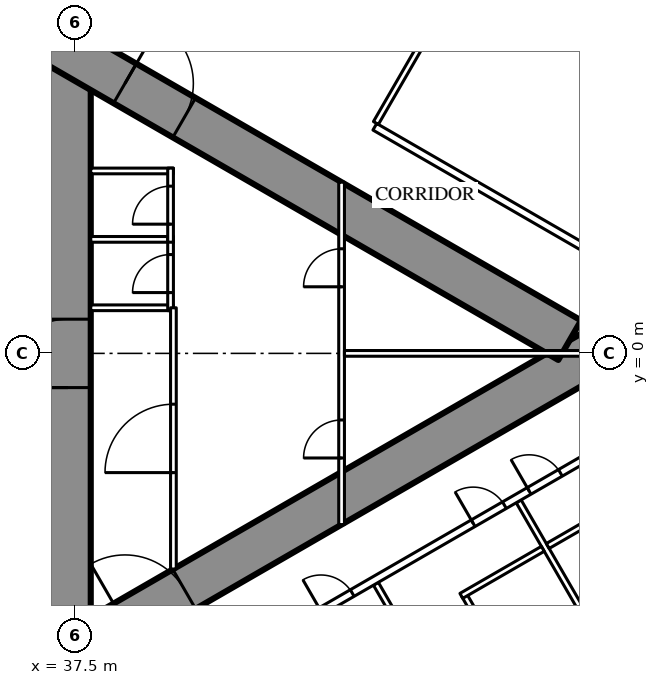
"""IFC4 building model, lengths in metres.
Left out: names, types, materials, properties, quantities, classifications, styles, units other than length and angle.
Written with IfcOpenShell. Run it as: python <this file> out.ifc"""

import sys

from ifc_helpers import new_model, si_unit, direction, frame, frame_2d, origin, place, context, subcontext, project, spatial, rectangle, extrude, element, fill, save


model = new_model("IFC4")
c1 = context("Model", 3, precision=1e-05, world=origin(), true_north=direction((0.0, 1.0)))
c2 = subcontext(c1, "Body", "Model", "MODEL_VIEW")
j1 = project(units=[si_unit("LENGTHUNIT", "METRE"), si_unit("PLANEANGLEUNIT", "RADIAN")], contexts=[c1])
p1 = place(None, origin())
s1 = spatial("IfcSite", under=j1, at=p1, CompositionType="ELEMENT")
p2 = place(p1, origin())
s2 = spatial("IfcBuilding", under=s1, at=p2, CompositionType="ELEMENT")
p3 = place(p2, frame((0.0, 0.0, 49.5)))
s3 = spatial("IfcBuildingStorey", under=s2, at=p3, CompositionType="ELEMENT", Elevation=49.5)
p4 = place(p3, frame((37.3, -8.6, 0.0), z_axis=(0.0, 0.0, 1.0), x_axis=(0.0, 1.0, 0.0)))
e1 = element("IfcWall", 1, at=p4, inside=s3, PredefinedType="SHEAR", context=c2, shape_type="SweptSolid", body=[
    extrude(rectangle(XDim=17.2, YDim=1.2, at=frame_2d((8.6, 0.0))), origin(), (0.0, 0.0, 1.0), 3.5),
])
p5 = place(p4, frame((7.7, 0.0, 0.0)))
e2 = element("IfcOpeningElement", 2, at=p5, cuts=e1, PredefinedType="OPENING", context=c2, shape_type="SweptSolid", body=[
    extrude(rectangle(XDim=1.8, YDim=2.2, at=frame_2d((0.9, 1.1))), frame((0.0, 0.61, 0.0), z_axis=(0.0, -1.0, 0.0), x_axis=(1.0, 0.0, 0.0)), (0.0, 0.0, 1.0), 1.22),
])
p6 = place(p3, frame((27.2, -13.8, 0.0), z_axis=(0.0, 0.0, 1.0), x_axis=(0.866027159892, 0.499996958321, 0.0)))
e3 = element("IfcWall", 3, at=p6, inside=s3, PredefinedType="SHEAR", context=c2, shape_type="SweptSolid", body=[
    extrude(rectangle(XDim=27.947, YDim=1.2, at=frame_2d((13.973, 0.0))), origin(), (0.0, 0.0, 1.0), 3.5),
])
p7 = place(p6, frame((4.6, 0.0, 0.0)))
e4 = element("IfcOpeningElement", 4, at=p7, cuts=e3, PredefinedType="OPENING", context=c2, shape_type="SweptSolid", body=[
    extrude(rectangle(XDim=1.0, YDim=2.2, at=frame_2d((0.5, 1.1))), frame((0.0, 0.61, 0.0), z_axis=(0.0, -1.0, 0.0), x_axis=(1.0, 0.0, 0.0)), (0.0, 0.0, 1.0), 1.22),
])
p8 = place(p6, frame((13.395, 0.0, 0.0)))
e5 = element("IfcOpeningElement", 5, at=p8, cuts=e3, PredefinedType="OPENING", context=c2, shape_type="SweptSolid", body=[
    extrude(rectangle(XDim=1.8, YDim=2.2, at=frame_2d((0.9, 1.1))), frame((0.0, 0.61, 0.0), z_axis=(0.0, -1.0, 0.0), x_axis=(1.0, 0.0, 0.0)), (0.0, 0.0, 1.0), 1.22),
])
p9 = place(p3, frame((27.2, 13.8, 0.0), z_axis=(0.0, 0.0, 1.0), x_axis=(0.866024515034, -0.500001539357, 0.0)))
e6 = element("IfcWall", 6, at=p9, inside=s3, PredefinedType="SHEAR", context=c2, shape_type="SweptSolid", body=[
    extrude(rectangle(XDim=26.907, YDim=1.2, at=frame_2d((13.454, 0.0))), origin(), (0.0, 0.0, 1.0), 3.5),
])
p10 = place(p9, frame((4.6, 0.0, 0.0)))
e7 = element("IfcOpeningElement", 7, at=p10, cuts=e6, PredefinedType="OPENING", context=c2, shape_type="SweptSolid", body=[
    extrude(rectangle(XDim=1.0, YDim=2.2, at=frame_2d((0.5, 1.1))), frame((0.0, 0.61, 0.0), z_axis=(0.0, -1.0, 0.0), x_axis=(1.0, 0.0, 0.0)), (0.0, 0.0, 1.0), 1.22),
])
p11 = place(p9, frame((13.395, 0.0, 0.0)))
e8 = element("IfcOpeningElement", 8, at=p11, cuts=e6, PredefinedType="OPENING", context=c2, shape_type="SweptSolid", body=[
    extrude(rectangle(XDim=1.8, YDim=2.2, at=frame_2d((0.9, 1.1))), frame((0.0, 0.61, 0.0), z_axis=(0.0, -1.0, 0.0), x_axis=(1.0, 0.0, 0.0)), (0.0, 0.0, 1.0), 1.22),
])
p12 = place(p3, frame((45.403, -6.062, 0.0), z_axis=(0.0, 0.0, 1.0), x_axis=(0.500007077968, -0.866021317279, 0.0)))
e9 = element("IfcWall", 9, at=p12, inside=s3, PredefinedType="PARTITIONING", context=c2, shape_type="SweptSolid", body=[
    extrude(rectangle(XDim=12.721, YDim=0.15, at=frame_2d((6.361, 0.0))), origin(), (0.0, 0.0, 1.0), 3.25),
])
p13 = place(p3, frame((49.159, -3.893, 0.0), z_axis=(0.0, 0.0, 1.0), x_axis=(0.499998773722, -0.866026111775, 0.0)))
e10 = element("IfcWall", 10, at=p13, inside=s3, PredefinedType="PARTITIONING", context=c2, shape_type="SweptSolid", body=[
    extrude(rectangle(XDim=9.892, YDim=0.15, at=frame_2d((4.946, 0.0))), origin(), (0.0, 0.0, 1.0), 2.25),
])
p14 = place(p3, frame((45.403, 6.062, 0.0), z_axis=(0.0, 0.0, 1.0), x_axis=(0.500013434677, 0.866017647131, 0.0)))
e11 = element("IfcWall", 11, at=p14, inside=s3, PredefinedType="PARTITIONING", context=c2, shape_type="SweptSolid", body=[
    extrude(rectangle(XDim=9.902, YDim=0.15, at=frame_2d((4.951, 0.0))), origin(), (0.0, 0.0, 1.0), 2.25),
])
p15 = place(p3, frame((37.96, -10.243, 0.0), z_axis=(0.0, 0.0, 1.0), x_axis=(0.866026429433, 0.499998223521, 0.0)))
e12 = element("IfcWall", 12, at=p15, inside=s3, PredefinedType="PARTITIONING", context=c2, shape_type="SweptSolid", body=[
    extrude(rectangle(XDim=20.487, YDim=0.2, at=frame_2d((10.243, 0.0))), origin(), (0.0, 0.0, 1.0), 3.25),
])
p16 = place(p15, frame((6.925, 0.0, 0.0)))
e13 = element("IfcOpeningElement", 13, at=p16, cuts=e12, PredefinedType="OPENING", context=c2, shape_type="SweptSolid", body=[
    extrude(rectangle(XDim=0.95, YDim=2.2, at=frame_2d((0.475, 1.1))), frame((0.0, 0.11, 0.0), z_axis=(0.0, -1.0, 0.0), x_axis=(1.0, 0.0, 0.0)), (0.0, 0.0, 1.0), 0.22),
])
p17 = place(p15, frame((11.549, 0.0, 0.0)))
e14 = element("IfcOpeningElement", 14, at=p17, cuts=e12, PredefinedType="OPENING", context=c2, shape_type="SweptSolid", body=[
    extrude(rectangle(XDim=0.95, YDim=2.2, at=frame_2d((0.475, 1.1))), frame((0.0, 0.11, 0.0), z_axis=(0.0, -1.0, 0.0), x_axis=(1.0, 0.0, 0.0)), (0.0, 0.0, 1.0), 0.22),
])
p18 = place(p15, frame((13.249, 0.0, 0.0)))
e15 = element("IfcOpeningElement", 15, at=p18, cuts=e12, PredefinedType="OPENING", context=c2, shape_type="SweptSolid", body=[
    extrude(rectangle(XDim=0.95, YDim=2.2, at=frame_2d((0.475, 1.1))), frame((0.0, 0.11, 0.0), z_axis=(0.0, -1.0, 0.0), x_axis=(1.0, 0.0, 0.0)), (0.0, 0.0, 1.0), 0.22),
])
p19 = place(p15, frame((17.585, 0.0, 0.0)))
e16 = element("IfcOpeningElement", 16, at=p19, cuts=e12, PredefinedType="OPENING", context=c2, shape_type="SweptSolid", body=[
    extrude(rectangle(XDim=0.95, YDim=2.2, at=frame_2d((0.475, 1.1))), frame((0.0, 0.11, 0.0), z_axis=(0.0, -1.0, 0.0), x_axis=(1.0, 0.0, 0.0)), (0.0, 0.0, 1.0), 0.22),
])
p20 = place(p15, frame((0.6, 0.0, 0.0)))
e17 = element("IfcOpeningElement", 17, at=p20, cuts=e12, PredefinedType="OPENING", context=c2, shape_type="SweptSolid", body=[
    extrude(rectangle(XDim=0.95, YDim=2.2, at=frame_2d((0.475, 1.1))), frame((0.0, 0.11, 0.0), z_axis=(0.0, -1.0, 0.0), x_axis=(1.0, 0.0, 0.0)), (0.0, 0.0, 1.0), 0.22),
])
p21 = place(p3, frame((45.375, 5.963, 0.0), z_axis=(0.0, 0.0, 1.0), x_axis=(0.86603164725, -0.499989185844, 0.0)))
e18 = element("IfcWall", 18, at=p21, inside=s3, PredefinedType="PARTITIONING", context=c2, shape_type="SweptSolid", body=[
    extrude(rectangle(XDim=11.805, YDim=0.2, at=frame_2d((5.903, 0.0))), origin(), (0.0, 0.0, 1.0), 3.25),
])
p22 = place(p21, frame((9.024, 0.0, 0.0)))
e19 = element("IfcOpeningElement", 19, at=p22, cuts=e18, PredefinedType="OPENING", context=c2, shape_type="SweptSolid", body=[
    extrude(rectangle(XDim=0.95, YDim=2.2, at=frame_2d((0.475, 1.1))), frame((0.0, 0.11, 0.0), z_axis=(0.0, -1.0, 0.0), x_axis=(1.0, 0.0, 0.0)), (0.0, 0.0, 1.0), 0.22),
])
p23 = place(p21, frame((7.324, 0.0, 0.0)))
e20 = element("IfcOpeningElement", 20, at=p23, cuts=e18, PredefinedType="OPENING", context=c2, shape_type="SweptSolid", body=[
    extrude(rectangle(XDim=0.95, YDim=2.2, at=frame_2d((0.475, 1.1))), frame((0.0, 0.11, 0.0), z_axis=(0.0, -1.0, 0.0), x_axis=(1.0, 0.0, 0.0)), (0.0, 0.0, 1.0), 0.22),
])
p24 = place(p3, frame((47.716, -6.343, 0.0), z_axis=(0.0, 0.0, 1.0), x_axis=(0.500006934395, -0.866021400173, 0.0)))
e21 = element("IfcWall", 21, at=p24, inside=s3, PredefinedType="PARTITIONING", context=c2, shape_type="SweptSolid", body=[
    extrude(rectangle(XDim=2.6, YDim=0.15, at=frame_2d((1.3, 0.0))), origin(), (0.0, 0.0, 1.0), 3.25),
])
p25 = place(p24, frame((0.9, 0.0, 0.0)))
e22 = element("IfcOpeningElement", 22, at=p25, cuts=e21, PredefinedType="OPENING", context=c2, shape_type="SweptSolid", body=[
    extrude(rectangle(XDim=0.8, YDim=2.2, at=frame_2d((0.4, 1.1))), frame((0.0, 0.085, 0.0), z_axis=(0.0, -1.0, 0.0), x_axis=(1.0, 0.0, 0.0)), (0.0, 0.0, 1.0), 0.17),
])
p26 = place(p3, frame((47.651, -6.38, 0.0), z_axis=(0.0, 0.0, 1.0), x_axis=(0.866031185235, 0.4999899861, 0.0)))
e23 = element("IfcWall", 23, at=p26, inside=s3, PredefinedType="PARTITIONING", context=c2, shape_type="SweptSolid", body=[
    extrude(rectangle(XDim=2.475, YDim=0.15, at=frame_2d((1.238, 0.0))), origin(), (0.0, 0.0, 1.0), 3.25),
])
p27 = place(p3, frame((49.925, -5.068, 0.0), z_axis=(0.0, 0.0, 1.0), x_axis=(0.866006523861, 0.500032699561, 0.0)))
e24 = element("IfcWall", 24, at=p27, inside=s3, PredefinedType="PARTITIONING", context=c2, shape_type="SweptSolid", body=[
    extrude(rectangle(XDim=2.475, YDim=0.15, at=frame_2d((1.237, 0.0))), origin(), (0.0, 0.0, 1.0), 3.25),
])
for number, where, z_axis, x_axis in (
    (25, (37.9, 1.2, 0.0), (0.0, 0.0, 1.0), (1.0, 0.0, 0.0)),
    (26, (37.9, 3.0, 0.0), (0.0, 0.0, 1.0), (1.0, 0.0, 0.0)),
    (27, (37.9, 4.8, 0.0), (0.0, 0.0, 1.0), (1.0, 0.0, 0.0)),
):
    element("IfcWall", number, at=place(p3, frame(where, z_axis=z_axis, x_axis=x_axis)), inside=s3, PredefinedType="PARTITIONING", context=c2, shape_type="SweptSolid", body=[
        extrude(rectangle(XDim=2.175, YDim=0.15, at=frame_2d((1.087, 0.0))), origin(), (0.0, 0.0, 1.0), 3.25),
    ])
p28 = place(p3, frame((40.0, 1.125, 0.0), z_axis=(0.0, 0.0, 1.0), x_axis=(0.0, 1.0, 0.0)))
e28 = element("IfcWall", 28, at=p28, inside=s3, PredefinedType="PARTITIONING", context=c2, shape_type="SweptSolid", body=[
    extrude(rectangle(XDim=1.95, YDim=0.15, at=frame_2d((0.975, 0.0))), origin(), (0.0, 0.0, 1.0), 3.25),
])
p29 = place(p28, frame((0.475, 0.0, 0.0)))
e29 = element("IfcOpeningElement", 29, at=p29, cuts=e28, PredefinedType="OPENING", context=c2, shape_type="SweptSolid", body=[
    extrude(rectangle(XDim=1.0, YDim=2.2, at=frame_2d((0.5, 1.1))), frame((0.0, 0.085, 0.0), z_axis=(0.0, -1.0, 0.0), x_axis=(1.0, 0.0, 0.0)), (0.0, 0.0, 1.0), 0.17),
])
p30 = place(p3, frame((40.0, 2.925, 0.0), z_axis=(0.0, 0.0, 1.0), x_axis=(0.0, 1.0, 0.0)))
e30 = element("IfcWall", 30, at=p30, inside=s3, PredefinedType="PARTITIONING", context=c2, shape_type="SweptSolid", body=[
    extrude(rectangle(XDim=1.95, YDim=0.15, at=frame_2d((0.975, 0.0))), origin(), (0.0, 0.0, 1.0), 3.25),
])
p31 = place(p30, frame((0.475, 0.0, 0.0)))
e31 = element("IfcOpeningElement", 31, at=p31, cuts=e30, PredefinedType="OPENING", context=c2, shape_type="SweptSolid", body=[
    extrude(rectangle(XDim=1.0, YDim=2.2, at=frame_2d((0.5, 1.1))), frame((0.0, 0.085, 0.0), z_axis=(0.0, -1.0, 0.0), x_axis=(1.0, 0.0, 0.0)), (0.0, 0.0, 1.0), 0.17),
])
p32 = place(p3, frame((40.075, -5.674, 0.0), z_axis=(0.0, 0.0, 1.0), x_axis=(0.0, 1.0, 0.0)))
e32 = element("IfcWall", 32, at=p32, inside=s3, PredefinedType="PARTITIONING", context=c2, shape_type="SweptSolid", body=[
    extrude(rectangle(XDim=6.874, YDim=0.15, at=frame_2d((3.437, 0.0))), origin(), (0.0, 0.0, 1.0), 3.25),
])
p33 = place(p32, frame((2.537, 0.0, 0.0)))
e33 = element("IfcOpeningElement", 33, at=p33, cuts=e32, PredefinedType="OPENING", context=c2, shape_type="SweptSolid", body=[
    extrude(rectangle(XDim=1.8, YDim=2.2, at=frame_2d((0.9, 1.1))), frame((0.0, 0.085, 0.0), z_axis=(0.0, -1.0, 0.0), x_axis=(1.0, 0.0, 0.0)), (0.0, 0.0, 1.0), 0.17),
])
p34 = place(p3, frame((44.5, -4.505, 0.0), z_axis=(0.0, 0.0, 1.0), x_axis=(0.0, 1.0, 0.0)))
e34 = element("IfcWall", 34, at=p34, inside=s3, PredefinedType="PARTITIONING", context=c2, shape_type="SweptSolid", body=[
    extrude(rectangle(XDim=9.009, YDim=0.15, at=frame_2d((4.505, 0.0))), origin(), (0.0, 0.0, 1.0), 2.45),
])
p35 = place(p34, frame((1.752, 0.0, 0.0)))
e35 = element("IfcOpeningElement", 35, at=p35, cuts=e34, PredefinedType="OPENING", context=c2, shape_type="SweptSolid", body=[
    extrude(rectangle(XDim=1.0, YDim=2.2, at=frame_2d((0.5, 1.1))), frame((0.0, 0.085, 0.0), z_axis=(0.0, -1.0, 0.0), x_axis=(1.0, 0.0, 0.0)), (0.0, 0.0, 1.0), 0.17),
])
p36 = place(p34, frame((6.257, 0.0, 0.0)))
e36 = element("IfcOpeningElement", 36, at=p36, cuts=e34, PredefinedType="OPENING", context=c2, shape_type="SweptSolid", body=[
    extrude(rectangle(XDim=1.0, YDim=2.2, at=frame_2d((0.5, 1.1))), frame((0.0, 0.085, 0.0), z_axis=(0.0, -1.0, 0.0), x_axis=(1.0, 0.0, 0.0)), (0.0, 0.0, 1.0), 0.17),
])
p37 = place(p3, frame((44.575, 0.0, 0.0), z_axis=(0.0, 0.0, 1.0), x_axis=(1.0, 0.0, 0.0)))
e37 = element("IfcWall", 37, at=p37, inside=s3, PredefinedType="PARTITIONING", context=c2, shape_type="SweptSolid", body=[
    extrude(rectangle(XDim=7.727, YDim=0.15, at=frame_2d((3.864, 0.0))), origin(), (0.0, 0.0, 1.0), 2.25),
])
p38 = place(p16, origin())
e38 = element("IfcDoor", 38, at=p38, inside=s3, OperationType="SINGLE_SWING_LEFT", PredefinedType="DOOR", context=c2, shape_type="SweptSolid", body=[
    extrude(rectangle(XDim=0.95, YDim=2.2, at=frame_2d((0.475, 1.1))), frame((0.0, 0.025, 0.0), z_axis=(0.0, -1.0, 0.0), x_axis=(1.0, 0.0, 0.0)), (0.0, 0.0, 1.0), 0.05),
])
fill(e13, e38)
p39 = place(p17, origin())
e39 = element("IfcDoor", 39, at=p39, inside=s3, OperationType="SINGLE_SWING_LEFT", PredefinedType="DOOR", context=c2, shape_type="SweptSolid", body=[
    extrude(rectangle(XDim=0.95, YDim=2.2, at=frame_2d((0.475, 1.1))), frame((0.0, 0.025, 0.0), z_axis=(0.0, -1.0, 0.0), x_axis=(1.0, 0.0, 0.0)), (0.0, 0.0, 1.0), 0.05),
])
fill(e14, e39)
p40 = place(p18, origin())
e40 = element("IfcDoor", 40, at=p40, inside=s3, OperationType="SINGLE_SWING_LEFT", PredefinedType="DOOR", context=c2, shape_type="SweptSolid", body=[
    extrude(rectangle(XDim=0.95, YDim=2.2, at=frame_2d((0.475, 1.1))), frame((0.0, 0.025, 0.0), z_axis=(0.0, -1.0, 0.0), x_axis=(1.0, 0.0, 0.0)), (0.0, 0.0, 1.0), 0.05),
])
fill(e15, e40)
p41 = place(p29, origin())
e41 = element("IfcDoor", 41, at=p41, inside=s3, OperationType="SINGLE_SWING_LEFT", PredefinedType="DOOR", context=c2, shape_type="SweptSolid", body=[
    extrude(rectangle(XDim=1.0, YDim=2.2, at=frame_2d((0.5, 1.1))), frame((0.0, 0.025, 0.0), z_axis=(0.0, -1.0, 0.0), x_axis=(1.0, 0.0, 0.0)), (0.0, 0.0, 1.0), 0.05),
])
fill(e29, e41)
p42 = place(p31, origin())
e42 = element("IfcDoor", 42, at=p42, inside=s3, OperationType="SINGLE_SWING_LEFT", PredefinedType="DOOR", context=c2, shape_type="SweptSolid", body=[
    extrude(rectangle(XDim=1.0, YDim=2.2, at=frame_2d((0.5, 1.1))), frame((0.0, 0.025, 0.0), z_axis=(0.0, -1.0, 0.0), x_axis=(1.0, 0.0, 0.0)), (0.0, 0.0, 1.0), 0.05),
])
fill(e31, e42)
p43 = place(p33, origin())
e43 = element("IfcDoor", 43, at=p43, inside=s3, OperationType="DOUBLE_DOOR_SINGLE_SWING", PredefinedType="DOOR", context=c2, shape_type="SweptSolid", body=[
    extrude(rectangle(XDim=1.8, YDim=2.2, at=frame_2d((0.9, 1.1))), frame((0.0, 0.025, 0.0), z_axis=(0.0, -1.0, 0.0), x_axis=(1.0, 0.0, 0.0)), (0.0, 0.0, 1.0), 0.05),
])
fill(e33, e43)
p44 = place(p35, origin())
e44 = element("IfcDoor", 44, at=p44, inside=s3, OperationType="SINGLE_SWING_LEFT", PredefinedType="DOOR", context=c2, shape_type="SweptSolid", body=[
    extrude(rectangle(XDim=1.0, YDim=2.2, at=frame_2d((0.5, 1.1))), frame((0.0, 0.025, 0.0), z_axis=(0.0, -1.0, 0.0), x_axis=(1.0, 0.0, 0.0)), (0.0, 0.0, 1.0), 0.05),
])
fill(e35, e44)
p45 = place(p36, origin())
e45 = element("IfcDoor", 45, at=p45, inside=s3, OperationType="SINGLE_SWING_LEFT", PredefinedType="DOOR", context=c2, shape_type="SweptSolid", body=[
    extrude(rectangle(XDim=1.0, YDim=2.2, at=frame_2d((0.5, 1.1))), frame((0.0, 0.025, 0.0), z_axis=(0.0, -1.0, 0.0), x_axis=(1.0, 0.0, 0.0)), (0.0, 0.0, 1.0), 0.05),
])
fill(e36, e45)
p46 = place(p8, origin())
e46 = element("IfcDoor", 46, at=p46, inside=s3, OperationType="DOUBLE_DOOR_SINGLE_SWING", PredefinedType="DOOR", context=c2, shape_type="SweptSolid", body=[
    extrude(rectangle(XDim=1.8, YDim=2.2, at=frame_2d((0.9, 1.1))), frame((0.0, 0.025, 0.0), z_axis=(0.0, -1.0, 0.0), x_axis=(1.0, 0.0, 0.0)), (0.0, 0.0, 1.0), 0.05),
])
fill(e5, e46)
p47 = place(p11, origin())
e47 = element("IfcDoor", 47, at=p47, inside=s3, OperationType="DOUBLE_DOOR_SINGLE_SWING", PredefinedType="DOOR", context=c2, shape_type="SweptSolid", body=[
    extrude(rectangle(XDim=1.8, YDim=2.2, at=frame_2d((0.9, 1.1))), frame((0.0, 0.025, 0.0), z_axis=(0.0, -1.0, 0.0), x_axis=(1.0, 0.0, 0.0)), (0.0, 0.0, 1.0), 0.05),
])
fill(e8, e47)
p48 = place(p5, origin())
e48 = element("IfcDoor", 48, at=p48, inside=s3, OperationType="DOUBLE_DOOR_SINGLE_SWING", PredefinedType="DOOR", context=c2, shape_type="SweptSolid", body=[
    extrude(rectangle(XDim=1.8, YDim=2.2, at=frame_2d((0.9, 1.1))), frame((0.0, 0.025, 0.0), z_axis=(0.0, -1.0, 0.0), x_axis=(1.0, 0.0, 0.0)), (0.0, 0.0, 1.0), 0.05),
])
fill(e2, e48)
save(model, sys.argv[1])
